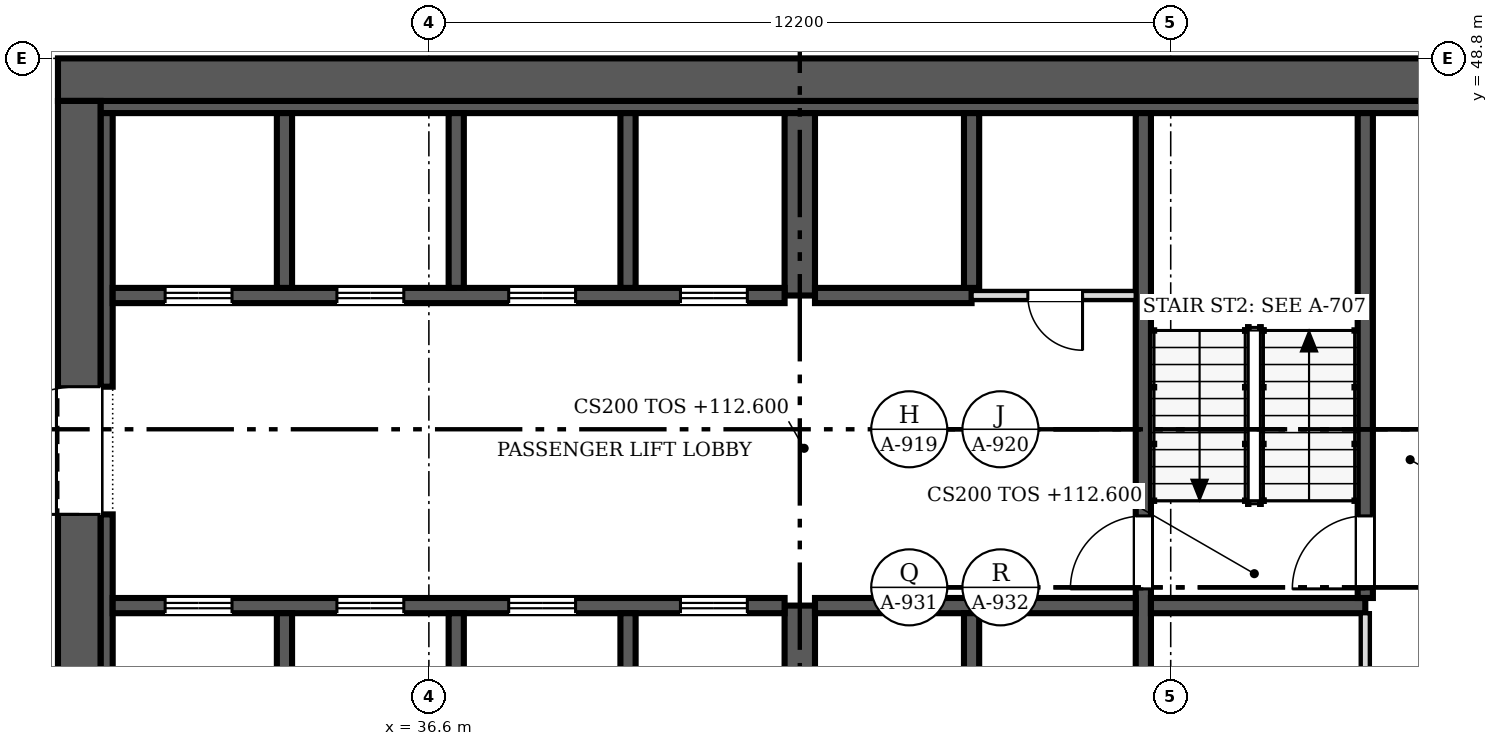
"""IFC4 building model, lengths in metres.
Left out: names, types, materials, properties, quantities, classifications, styles, units other than length and angle.
Written with IfcOpenShell. Run it as: python <this file> out.ifc"""

import sys

from ifc_helpers import new_model, si_unit, direction, frame, frame_2d, origin, place, context, subcontext, project, spatial, rectangle, extrude, source, transform, mapped, element, fill, save


model = new_model("IFC4")
c1 = context("Model", 3, precision=1e-05, world=origin(), true_north=direction((0.0, 1.0)))
c2 = subcontext(c1, "Body", "Model", "MODEL_VIEW")
j1 = project(units=[si_unit("LENGTHUNIT", "METRE"), si_unit("PLANEANGLEUNIT", "RADIAN")], contexts=[c1])
p1 = place(None, origin())
s1 = spatial("IfcSite", under=j1, at=p1, CompositionType="ELEMENT")
p2 = place(p1, origin())
s2 = spatial("IfcBuilding", under=s1, at=p2, CompositionType="ELEMENT")
p3 = place(p2, frame((0.0, 0.0, 112.6)))
s3 = spatial("IfcBuildingStorey", under=s2, at=p3, CompositionType="ELEMENT", Elevation=112.6)
p4 = place(p3, frame((30.85, 25.1, 0.0), z_axis=(0.0, 0.0, 1.0), x_axis=(0.0, 1.0, 0.0)))
e1 = element("IfcWall", 1, at=p4, inside=s3, PredefinedType="SHEAR", context=c2, shape_type="SweptSolid", body=[
    extrude(rectangle(XDim=23.0, YDim=0.7, at=frame_2d((11.5, 0.0))), origin(), (0.0, 0.0, 1.0), 3.8),
])
m1 = source(origin(), c2, "Body", "SweptSolid", [
    extrude(rectangle(XDim=2.1, YDim=2.4, at=frame_2d((1.05, 1.2))), frame((0.0, 0.36, 0.0), z_axis=(0.0, -1.0, 0.0), x_axis=(1.0, 0.0, 0.0)), (0.0, 0.0, 1.0), 0.72),
])
p5 = place(p4, frame((4.7, 0.0, 0.0)))
e2 = element("IfcOpeningElement", 2, at=p5, cuts=e1, PredefinedType="OPENING", context=c2, shape_type="MappedRepresentation", body=[
    mapped(m1, transform((0.0, 0.0, 0.0), scale=1.0)),
])
p6 = place(p4, frame((16.2, 0.0, 0.0)))
e3 = element("IfcOpeningElement", 3, at=p6, cuts=e1, PredefinedType="OPENING", context=c2, shape_type="MappedRepresentation", body=[
    mapped(m1, transform((0.0, 0.0, 0.0), scale=1.0)),
])
p7 = place(p3, frame((30.5, 48.45, 0.0), z_axis=(0.0, 0.0, 1.0), x_axis=(1.0, 0.0, 0.0)))
e4 = element("IfcWall", 4, at=p7, inside=s3, PredefinedType="SHEAR", context=c2, shape_type="SweptSolid", body=[
    extrude(rectangle(XDim=24.4, YDim=0.7, at=frame_2d((12.2, 0.0))), origin(), (0.0, 0.0, 1.0), 3.8),
])
p8 = place(p3, frame((31.2, 48.0, 0.0), z_axis=(0.0, 0.0, 1.0), x_axis=(1.0, 0.0, 0.0)))
e5 = element("IfcWall", 5, at=p8, inside=s3, PredefinedType="SOLIDWALL", context=c2, shape_type="SweptSolid", body=[
    extrude(rectangle(XDim=23.0, YDim=0.2, at=frame_2d((11.5, 0.0))), origin(), (0.0, 0.0, 1.0), 3.8),
])
p9 = place(p3, frame((31.3, 31.9, 0.0), z_axis=(0.0, 0.0, 1.0), x_axis=(0.0, 1.0, 0.0)))
e6 = element("IfcWall", 6, at=p9, inside=s3, PredefinedType="SOLIDWALL", context=c2, shape_type="SweptSolid", body=[
    extrude(rectangle(XDim=9.4, YDim=0.2, at=frame_2d((4.7, 0.0))), origin(), (0.0, 0.0, 1.0), 3.8),
])
p10 = place(p3, frame((31.3, 43.4, 0.0), z_axis=(0.0, 0.0, 1.0), x_axis=(0.0, 1.0, 0.0)))
e7 = element("IfcWall", 7, at=p10, inside=s3, PredefinedType="SOLIDWALL", context=c2, shape_type="SweptSolid", body=[
    extrude(rectangle(XDim=4.5, YDim=0.2, at=frame_2d((2.25, 0.0))), origin(), (0.0, 0.0, 1.0), 3.8),
])
p11 = place(p3, frame((42.7, 36.85, 0.0), z_axis=(0.0, 0.0, 1.0), x_axis=(0.0, 1.0, 0.0)))
e8 = element("IfcWall", 8, at=p11, inside=s3, PredefinedType="SHEAR", context=c2, shape_type="SweptSolid", body=[
    extrude(rectangle(XDim=2.95, YDim=0.5, at=frame_2d((1.475, 0.0))), origin(), (0.0, 0.0, 1.0), 3.8),
])
p12 = place(p3, frame((42.7, 44.9, 0.0), z_axis=(0.0, 0.0, 1.0), x_axis=(0.0, 1.0, 0.0)))
e9 = element("IfcWall", 9, at=p12, inside=s3, PredefinedType="SHEAR", context=c2, shape_type="SweptSolid", body=[
    extrude(rectangle(XDim=3.0, YDim=0.5, at=frame_2d((1.5, 0.0))), origin(), (0.0, 0.0, 1.0), 3.8),
])
p13 = place(p3, frame((48.35, 47.9, 0.0), z_axis=(0.0, 0.0, 1.0), x_axis=(0.0, -1.0, 0.0)))
e10 = element("IfcWall", 10, at=p13, inside=s3, PredefinedType="SOLIDWALL", context=c2, shape_type="SweptSolid", body=[
    extrude(rectangle(XDim=11.05, YDim=0.25, at=frame_2d((5.525, 0.0))), origin(), (0.0, 0.0, 1.0), 3.8),
])
m2 = source(origin(), c2, "Body", "SweptSolid", [
    extrude(rectangle(XDim=1.2, YDim=2.1, at=frame_2d((0.6, 1.05))), frame((0.0, 0.135, 0.0), z_axis=(0.0, -1.0, 0.0), x_axis=(1.0, 0.0, 0.0)), (0.0, 0.0, 1.0), 0.27),
])
p14 = place(p13, frame((6.625, 0.0, 0.0)))
e11 = element("IfcOpeningElement", 11, at=p14, cuts=e10, PredefinedType="OPENING", context=c2, shape_type="MappedRepresentation", body=[
    mapped(m2, transform((0.0, 0.0, 0.0), scale=1.0)),
])
p15 = place(p3, frame((31.4, 39.8, 0.0), z_axis=(0.0, 0.0, 1.0), x_axis=(1.0, 0.0, 0.0)))
e12 = element("IfcWall", 12, at=p15, inside=s3, PredefinedType="SOLIDWALL", context=c2, shape_type="SweptSolid", body=[
    extrude(rectangle(XDim=11.05, YDim=0.25, at=frame_2d((5.525, 0.0))), origin(), (0.0, 0.0, 1.0), 3.8),
])
m3 = source(origin(), c2, "Body", "SweptSolid", [
    extrude(rectangle(XDim=1.1, YDim=2.1, at=frame_2d((0.55, 1.05))), frame((0.0, 0.135, 0.0), z_axis=(0.0, -1.0, 0.0), x_axis=(1.0, 0.0, 0.0)), (0.0, 0.0, 1.0), 0.27),
])
p16 = place(p15, frame((0.863, 0.0, 0.0)))
e13 = element("IfcOpeningElement", 13, at=p16, cuts=e12, PredefinedType="OPENING", context=c2, shape_type="MappedRepresentation", body=[
    mapped(m3, transform((0.0, 0.0, 0.0), scale=1.0)),
])
p17 = place(p15, frame((3.688, 0.0, 0.0)))
e14 = element("IfcOpeningElement", 14, at=p17, cuts=e12, PredefinedType="OPENING", context=c2, shape_type="MappedRepresentation", body=[
    mapped(m3, transform((0.0, 0.0, 0.0), scale=1.0)),
])
p18 = place(p15, frame((6.512, 0.0, 0.0)))
e15 = element("IfcOpeningElement", 15, at=p18, cuts=e12, PredefinedType="OPENING", context=c2, shape_type="MappedRepresentation", body=[
    mapped(m3, transform((0.0, 0.0, 0.0), scale=1.0)),
])
p19 = place(p15, frame((9.337, 0.0, 0.0)))
e16 = element("IfcOpeningElement", 16, at=p19, cuts=e12, PredefinedType="OPENING", context=c2, shape_type="MappedRepresentation", body=[
    mapped(m3, transform((0.0, 0.0, 0.0), scale=1.0)),
])
p20 = place(p3, frame((42.95, 39.8, 0.0), z_axis=(0.0, 0.0, 1.0), x_axis=(1.0, 0.0, 0.0)))
e17 = element("IfcWall", 17, at=p20, inside=s3, PredefinedType="SOLIDWALL", context=c2, shape_type="SweptSolid", body=[
    extrude(rectangle(XDim=5.275, YDim=0.25, at=frame_2d((2.638, 0.0))), origin(), (0.0, 0.0, 1.0), 3.6),
])
p21 = place(p3, frame((48.475, 39.8, 0.0), z_axis=(0.0, 0.0, 1.0), x_axis=(1.0, 0.0, 0.0)))
e18 = element("IfcWall", 18, at=p21, inside=s3, PredefinedType="SOLIDWALL", context=c2, shape_type="SweptSolid", body=[
    extrude(rectangle(XDim=3.525, YDim=0.25, at=frame_2d((1.762, 0.0))), origin(), (0.0, 0.0, 1.0), 3.8),
])
p22 = place(p3, frame((42.45, 44.9, 0.0), z_axis=(0.0, 0.0, 1.0), x_axis=(-1.0, 0.0, 0.0)))
e19 = element("IfcWall", 19, at=p22, inside=s3, PredefinedType="SOLIDWALL", context=c2, shape_type="SweptSolid", body=[
    extrude(rectangle(XDim=11.05, YDim=0.25, at=frame_2d((5.525, 0.0))), origin(), (0.0, 0.0, 1.0), 3.8),
])
p23 = place(p22, frame((9.087, 0.0, 0.0)))
e20 = element("IfcOpeningElement", 20, at=p23, cuts=e19, PredefinedType="OPENING", context=c2, shape_type="MappedRepresentation", body=[
    mapped(m3, transform((0.0, 0.0, 0.0), scale=1.0)),
])
p24 = place(p22, frame((6.262, 0.0, 0.0)))
e21 = element("IfcOpeningElement", 21, at=p24, cuts=e19, PredefinedType="OPENING", context=c2, shape_type="MappedRepresentation", body=[
    mapped(m3, transform((0.0, 0.0, 0.0), scale=1.0)),
])
p25 = place(p22, frame((3.438, 0.0, 0.0)))
e22 = element("IfcOpeningElement", 22, at=p25, cuts=e19, PredefinedType="OPENING", context=c2, shape_type="MappedRepresentation", body=[
    mapped(m3, transform((0.0, 0.0, 0.0), scale=1.0)),
])
p26 = place(p22, frame((0.613, 0.0, 0.0)))
e23 = element("IfcOpeningElement", 23, at=p26, cuts=e19, PredefinedType="OPENING", context=c2, shape_type="MappedRepresentation", body=[
    mapped(m3, transform((0.0, 0.0, 0.0), scale=1.0)),
])
p27 = place(p3, frame((42.95, 44.9, 0.0), z_axis=(0.0, 0.0, 1.0), x_axis=(1.0, 0.0, 0.0)))
e24 = element("IfcWall", 24, at=p27, inside=s3, PredefinedType="SOLIDWALL", context=c2, shape_type="SweptSolid", body=[
    extrude(rectangle(XDim=2.575, YDim=0.25, at=frame_2d((1.288, 0.0))), origin(), (0.0, 0.0, 1.0), 3.6),
])
p28 = place(p3, frame((52.0, 39.925, 0.0), z_axis=(0.0, 0.0, 1.0), x_axis=(0.0, 1.0, 0.0)))
e25 = element("IfcWall", 25, at=p28, inside=s3, PredefinedType="SOLIDWALL", context=c2, shape_type="SweptSolid", body=[
    extrude(rectangle(XDim=7.975, YDim=0.25, at=frame_2d((3.987, 0.0))), origin(), (0.0, 0.0, 1.0), 3.8),
])
p29 = place(p28, frame((0.15, 0.0, 0.0)))
e26 = element("IfcOpeningElement", 26, at=p29, cuts=e25, PredefinedType="OPENING", context=c2, shape_type="MappedRepresentation", body=[
    mapped(m2, transform((0.0, 0.0, 0.0), scale=1.0)),
])
p30 = place(p3, frame((45.525, 36.85, 0.0), z_axis=(0.0, 0.0, 1.0), x_axis=(0.0, 1.0, 0.0)))
e27 = element("IfcWall", 27, at=p30, inside=s3, PredefinedType="SOLIDWALL", context=c2, shape_type="SweptSolid", body=[
    extrude(rectangle(XDim=2.825, YDim=0.25, at=frame_2d((1.413, 0.0))), origin(), (0.0, 0.0, 1.0), 3.6),
])
for number, where, z_axis, x_axis in (
    (28, (34.225, 36.85, 0.0), (0.0, 0.0, 1.0), (0.0, 1.0, 0.0)),
    (29, (37.05, 36.85, 0.0), (0.0, 0.0, 1.0), (0.0, 1.0, 0.0)),
    (30, (39.875, 36.85, 0.0), (0.0, 0.0, 1.0), (0.0, 1.0, 0.0)),
):
    element("IfcWall", number, at=place(p3, frame(where, z_axis=z_axis, x_axis=x_axis)), inside=s3, PredefinedType="SOLIDWALL", context=c2, shape_type="SweptSolid", body=[
        extrude(rectangle(XDim=2.825, YDim=0.25, at=frame_2d((1.413, 0.0))), origin(), (0.0, 0.0, 1.0), 3.8),
    ])
for number, where, z_axis, x_axis in (
    (31, (34.225, 45.025, 0.0), (0.0, 0.0, 1.0), (0.0, 1.0, 0.0)),
    (32, (37.05, 45.025, 0.0), (0.0, 0.0, 1.0), (0.0, 1.0, 0.0)),
    (33, (39.875, 45.025, 0.0), (0.0, 0.0, 1.0), (0.0, 1.0, 0.0)),
):
    element("IfcWall", number, at=place(p3, frame(where, z_axis=z_axis, x_axis=x_axis)), inside=s3, PredefinedType="SOLIDWALL", context=c2, shape_type="SweptSolid", body=[
        extrude(rectangle(XDim=2.875, YDim=0.25, at=frame_2d((1.438, 0.0))), origin(), (0.0, 0.0, 1.0), 3.8),
    ])
p31 = place(p3, frame((45.525, 45.025, 0.0), z_axis=(0.0, 0.0, 1.0), x_axis=(0.0, 1.0, 0.0)))
e34 = element("IfcWall", 34, at=p31, inside=s3, PredefinedType="SOLIDWALL", context=c2, shape_type="SweptSolid", body=[
    extrude(rectangle(XDim=2.875, YDim=0.25, at=frame_2d((1.438, 0.0))), origin(), (0.0, 0.0, 1.0), 3.6),
])
p32 = place(p3, frame((52.0, 33.525, 0.0), z_axis=(0.0, 0.0, 1.0), x_axis=(0.0, 1.0, 0.0)))
e35 = element("IfcWall", 35, at=p32, inside=s3, PredefinedType="PARTITIONING", context=c2, shape_type="SweptSolid", body=[
    extrude(rectangle(XDim=6.15, YDim=0.15, at=frame_2d((3.075, 0.0))), origin(), (0.0, 0.0, 1.0), 3.6),
])
m4 = source(origin(), c2, "Body", "SweptSolid", [
    extrude(rectangle(XDim=0.9, YDim=2.1, at=frame_2d((0.45, 1.05))), frame((0.0, 0.085, 0.0), z_axis=(0.0, -1.0, 0.0), x_axis=(1.0, 0.0, 0.0)), (0.0, 0.0, 1.0), 0.17),
])
p33 = place(p32, frame((1.025, 0.0, 0.0)))
e36 = element("IfcOpeningElement", 36, at=p33, cuts=e35, PredefinedType="OPENING", context=c2, shape_type="MappedRepresentation", body=[
    mapped(m4, transform((0.0, 0.0, 0.0), scale=1.0)),
])
p34 = place(p3, frame((45.525, 44.9, 0.0), z_axis=(0.0, 0.0, 1.0), x_axis=(1.0, 0.0, 0.0)))
e37 = element("IfcWall", 37, at=p34, inside=s3, PredefinedType="PARTITIONING", context=c2, shape_type="SweptSolid", body=[
    extrude(rectangle(XDim=2.7, YDim=0.15, at=frame_2d((1.35, 0.0))), origin(), (0.0, 0.0, 1.0), 3.6),
])
p35 = place(p34, frame((0.925, 0.0, 0.0)))
e38 = element("IfcOpeningElement", 38, at=p35, cuts=e37, PredefinedType="OPENING", context=c2, shape_type="MappedRepresentation", body=[
    mapped(m4, transform((0.0, 0.0, 0.0), scale=1.0)),
])
m5 = source(origin(), c2, "Body", "SweptSolid", [
    extrude(rectangle(XDim=2.1, YDim=2.4, at=frame_2d((1.05, 1.2))), frame((0.0, 0.025, 0.0), z_axis=(0.0, -1.0, 0.0), x_axis=(1.0, 0.0, 0.0)), (0.0, 0.0, 1.0), 0.05),
])
p36 = place(p6, origin())
e39 = element("IfcDoor", 39, at=p36, inside=s3, OperationType="DOUBLE_DOOR_SINGLE_SWING", PredefinedType="DOOR", context=c2, shape_type="MappedRepresentation", body=[
    mapped(m5, transform((0.0, 0.0, 0.0), scale=1.0)),
])
fill(e3, e39)
m6 = source(origin(), c2, "Body", "SweptSolid", [
    extrude(rectangle(XDim=1.2, YDim=2.1, at=frame_2d((0.6, 1.05))), frame((0.0, 0.025, 0.0), z_axis=(0.0, -1.0, 0.0), x_axis=(1.0, 0.0, 0.0)), (0.0, 0.0, 1.0), 0.05),
])
p37 = place(p14, origin())
e40 = element("IfcDoor", 40, at=p37, inside=s3, OperationType="SINGLE_SWING_RIGHT", PredefinedType="DOOR", context=c2, shape_type="MappedRepresentation", body=[
    mapped(m6, transform((0.0, 0.0, 0.0), scale=1.0)),
])
fill(e11, e40)
m7 = source(origin(), c2, "Body", "SweptSolid", [
    extrude(rectangle(XDim=1.1, YDim=2.1, at=frame_2d((0.55, 1.05))), frame((0.0, 0.025, 0.0), z_axis=(0.0, -1.0, 0.0), x_axis=(1.0, 0.0, 0.0)), (0.0, 0.0, 1.0), 0.05),
])
p38 = place(p16, origin())
e41 = element("IfcDoor", 41, at=p38, inside=s3, OperationType="DOUBLE_DOOR_SLIDING", PredefinedType="DOOR", context=c2, shape_type="MappedRepresentation", body=[
    mapped(m7, transform((0.0, 0.0, 0.0), scale=1.0)),
])
fill(e13, e41)
p39 = place(p17, origin())
e42 = element("IfcDoor", 42, at=p39, inside=s3, OperationType="DOUBLE_DOOR_SLIDING", PredefinedType="DOOR", context=c2, shape_type="MappedRepresentation", body=[
    mapped(m7, transform((0.0, 0.0, 0.0), scale=1.0)),
])
fill(e14, e42)
p40 = place(p18, origin())
e43 = element("IfcDoor", 43, at=p40, inside=s3, OperationType="DOUBLE_DOOR_SLIDING", PredefinedType="DOOR", context=c2, shape_type="MappedRepresentation", body=[
    mapped(m7, transform((0.0, 0.0, 0.0), scale=1.0)),
])
fill(e15, e43)
p41 = place(p19, origin())
e44 = element("IfcDoor", 44, at=p41, inside=s3, OperationType="DOUBLE_DOOR_SLIDING", PredefinedType="DOOR", context=c2, shape_type="MappedRepresentation", body=[
    mapped(m7, transform((0.0, 0.0, 0.0), scale=1.0)),
])
fill(e16, e44)
p42 = place(p23, origin())
e45 = element("IfcDoor", 45, at=p42, inside=s3, OperationType="DOUBLE_DOOR_SLIDING", PredefinedType="DOOR", context=c2, shape_type="MappedRepresentation", body=[
    mapped(m7, transform((0.0, 0.0, 0.0), scale=1.0)),
])
fill(e20, e45)
p43 = place(p24, origin())
e46 = element("IfcDoor", 46, at=p43, inside=s3, OperationType="DOUBLE_DOOR_SLIDING", PredefinedType="DOOR", context=c2, shape_type="MappedRepresentation", body=[
    mapped(m7, transform((0.0, 0.0, 0.0), scale=1.0)),
])
fill(e21, e46)
p44 = place(p25, origin())
e47 = element("IfcDoor", 47, at=p44, inside=s3, OperationType="DOUBLE_DOOR_SLIDING", PredefinedType="DOOR", context=c2, shape_type="MappedRepresentation", body=[
    mapped(m7, transform((0.0, 0.0, 0.0), scale=1.0)),
])
fill(e22, e47)
p45 = place(p26, origin())
e48 = element("IfcDoor", 48, at=p45, inside=s3, OperationType="DOUBLE_DOOR_SLIDING", PredefinedType="DOOR", context=c2, shape_type="MappedRepresentation", body=[
    mapped(m7, transform((0.0, 0.0, 0.0), scale=1.0)),
])
fill(e23, e48)
p46 = place(p29, origin())
e49 = element("IfcDoor", 49, at=p46, inside=s3, OperationType="SINGLE_SWING_LEFT", PredefinedType="DOOR", context=c2, shape_type="MappedRepresentation", body=[
    mapped(m6, transform((0.0, 0.0, 0.0), scale=1.0)),
])
fill(e26, e49)
m8 = source(origin(), c2, "Body", "SweptSolid", [
    extrude(rectangle(XDim=0.9, YDim=2.1, at=frame_2d((0.45, 1.05))), frame((0.0, 0.025, 0.0), z_axis=(0.0, -1.0, 0.0), x_axis=(1.0, 0.0, 0.0)), (0.0, 0.0, 1.0), 0.05),
])
p47 = place(p35, origin())
e50 = element("IfcDoor", 50, at=p47, inside=s3, OperationType="SINGLE_SWING_RIGHT", PredefinedType="DOOR", context=c2, shape_type="MappedRepresentation", body=[
    mapped(m8, transform((0.0, 0.0, 0.0), scale=1.0)),
])
fill(e38, e50)
save(model, sys.argv[1])
